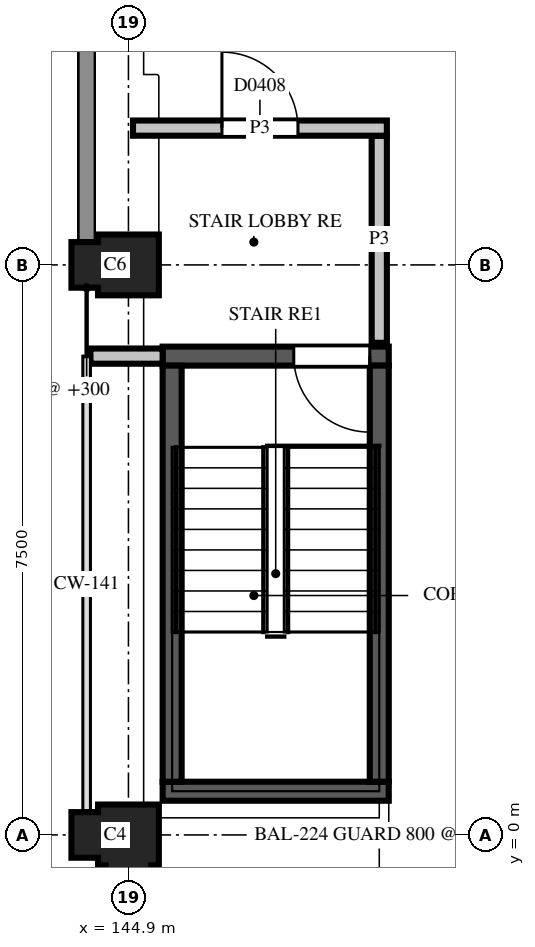
"""IFC4 building model, lengths in metres.
Left out: names, types, materials, properties, quantities, classifications, styles, units other than length and angle.
Written with IfcOpenShell. Run it as: python <this file> out.ifc"""

import sys

from ifc_helpers import new_model, si_unit, direction, frame, frame_2d, origin, place, context, subcontext, project, spatial, polyline, rectangle, outline, extrude, element, fill, save


model = new_model("IFC4")
c1 = context("Model", 3, precision=1e-05, world=origin(), true_north=direction((0.0, 1.0)))
c2 = subcontext(c1, "Body", "Model", "MODEL_VIEW")
j1 = project(units=[si_unit("LENGTHUNIT", "METRE"), si_unit("PLANEANGLEUNIT", "RADIAN")], contexts=[c1])
p1 = place(None, origin())
s1 = spatial("IfcSite", under=j1, at=p1, CompositionType="ELEMENT")
p2 = place(p1, origin())
s2 = spatial("IfcBuilding", under=s1, at=p2, CompositionType="ELEMENT")
p3 = place(p2, frame((0.0, 0.0, 15.6)))
s3 = spatial("IfcBuildingStorey", under=s2, at=p3, CompositionType="ELEMENT", Elevation=15.6)
p4 = place(p3, frame((144.9, 0.0, 0.0), z_axis=(0.0, 0.0, 1.0), x_axis=(-1.0, 0.0, 0.0)))
e1 = element("IfcColumn", 1, at=p4, inside=s3, PredefinedType="COLUMN", context=c2, shape_type="SweptSolid", body=[
    extrude(outline(polyline([(-0.4, -0.4), (0.4, -0.4), (0.4, -0.3), (0.75, -0.3), (0.75, 0.3), (0.4, 0.3), (0.4, 0.4), (0.3, 0.4), (0.3, 0.75), (-0.3, 0.75), (-0.3, 0.4), (-0.4, 0.4), (-0.4, -0.4)])), origin(), (0.0, 0.0, 1.0), 3.7),
])
p5 = place(p3, frame((144.9, 7.5, 0.0), z_axis=(0.0, 0.0, 1.0), x_axis=(-1.0, 0.0, 0.0)))
e2 = element("IfcColumn", 2, at=p5, inside=s3, PredefinedType="COLUMN", context=c2, shape_type="SweptSolid", body=[
    extrude(outline(polyline([(-0.4, -0.4), (0.4, -0.4), (0.4, -0.3), (0.75, -0.3), (0.75, 0.3), (0.4, 0.3), (0.4, 0.4), (-0.4, 0.4), (-0.4, -0.4)])), origin(), (0.0, 0.0, 1.0), 3.7),
])
p6 = place(p3, frame((145.35, 0.575, 0.0), z_axis=(0.0, 0.0, 1.0), x_axis=(1.0, 0.0, 0.0)))
e3 = element("IfcWall", 3, at=p6, inside=s3, PredefinedType="SHEAR", context=c2, shape_type="SweptSolid", body=[
    extrude(rectangle(XDim=2.975, YDim=0.25, at=frame_2d((1.487, 0.0))), origin(), (0.0, 0.0, 1.0), 3.7),
])
p7 = place(p3, frame((145.35, 6.3, 0.0), z_axis=(0.0, 0.0, 1.0), x_axis=(1.0, 0.0, 0.0)))
e4 = element("IfcWall", 4, at=p7, inside=s3, PredefinedType="SHEAR", context=c2, shape_type="SweptSolid", body=[
    extrude(rectangle(XDim=2.975, YDim=0.25, at=frame_2d((1.487, 0.0))), origin(), (0.0, 0.0, 1.0), 3.7),
])
p8 = place(p7, frame((1.725, 0.0, 0.0)))
e5 = element("IfcOpeningElement", 5, at=p8, cuts=e4, PredefinedType="OPENING", context=c2, shape_type="SweptSolid", body=[
    extrude(rectangle(XDim=1.0, YDim=2.1, at=frame_2d((0.5, 1.05))), frame((0.0, 0.135, 0.0), z_axis=(0.0, -1.0, 0.0), x_axis=(1.0, 0.0, 0.0)), (0.0, 0.0, 1.0), 0.27),
])
for number, where, z_axis, x_axis in (
    (6, (145.475, 0.7, 0.0), (0.0, 0.0, 1.0), (0.0, 1.0, 0.0)),
    (7, (148.2, 0.7, 0.0), (0.0, 0.0, 1.0), (0.0, 1.0, 0.0)),
):
    element("IfcWall", number, at=place(p3, frame(where, z_axis=z_axis, x_axis=x_axis)), inside=s3, PredefinedType="SHEAR", context=c2, shape_type="SweptSolid", body=[
        extrude(rectangle(XDim=5.475, YDim=0.25, at=frame_2d((2.738, 0.0))), origin(), (0.0, 0.0, 1.0), 3.7),
    ])
p9 = place(p3, frame((144.4, 6.3, 0.0), z_axis=(0.0, 0.0, 1.0), x_axis=(1.0, 0.0, 0.0)))
e8 = element("IfcWall", 8, at=p9, inside=s3, PredefinedType="PARTITIONING", context=c2, shape_type="SweptSolid", body=[
    extrude(rectangle(XDim=0.95, YDim=0.2, at=frame_2d((0.475, 0.0))), origin(), (0.0, 0.0, 1.0), 2.88),
])
p10 = place(p3, frame((148.2, 6.475, 0.0), z_axis=(0.0, 0.0, 1.0), x_axis=(0.0, 1.0, 0.0)))
e9 = element("IfcWall", 9, at=p10, inside=s3, PredefinedType="PARTITIONING", context=c2, shape_type="SweptSolid", body=[
    extrude(rectangle(XDim=2.725, YDim=0.2, at=frame_2d((1.362, 0.0))), origin(), (0.0, 0.0, 1.0), 2.88),
])
p11 = place(p3, frame((148.3, 9.3, 0.0), z_axis=(0.0, 0.0, 1.0), x_axis=(-1.0, 0.0, 0.0)))
e10 = element("IfcWall", 10, at=p11, inside=s3, PredefinedType="PARTITIONING", context=c2, shape_type="SweptSolid", body=[
    extrude(rectangle(XDim=3.34, YDim=0.2, at=frame_2d((1.67, 0.0))), origin(), (0.0, 0.0, 1.0), 2.88),
])
p12 = place(p11, frame((1.17, 0.0, 0.0)))
e11 = element("IfcOpeningElement", 11, at=p12, cuts=e10, PredefinedType="OPENING", context=c2, shape_type="SweptSolid", body=[
    extrude(rectangle(XDim=1.0, YDim=2.1, at=frame_2d((0.5, 1.05))), frame((0.0, 0.11, 0.0), z_axis=(0.0, -1.0, 0.0), x_axis=(1.0, 0.0, 0.0)), (0.0, 0.0, 1.0), 0.22),
])
p13 = place(p12, origin())
e12 = element("IfcDoor", 12, at=p13, inside=s3, OperationType="SINGLE_SWING_RIGHT", PredefinedType="DOOR", context=c2, shape_type="SweptSolid", body=[
    extrude(rectangle(XDim=1.0, YDim=2.1, at=frame_2d((0.5, 1.05))), frame((0.0, 0.025, 0.0), z_axis=(0.0, -1.0, 0.0), x_axis=(1.0, 0.0, 0.0)), (0.0, 0.0, 1.0), 0.05),
])
fill(e11, e12)
p14 = place(p8, origin())
e13 = element("IfcDoor", 13, at=p14, inside=s3, OperationType="SINGLE_SWING_RIGHT", PredefinedType="DOOR", context=c2, shape_type="SweptSolid", body=[
    extrude(rectangle(XDim=1.0, YDim=2.1, at=frame_2d((0.5, 1.05))), frame((0.0, 0.025, 0.0), z_axis=(0.0, -1.0, 0.0), x_axis=(1.0, 0.0, 0.0)), (0.0, 0.0, 1.0), 0.05),
])
fill(e5, e13)
save(model, sys.argv[1])
